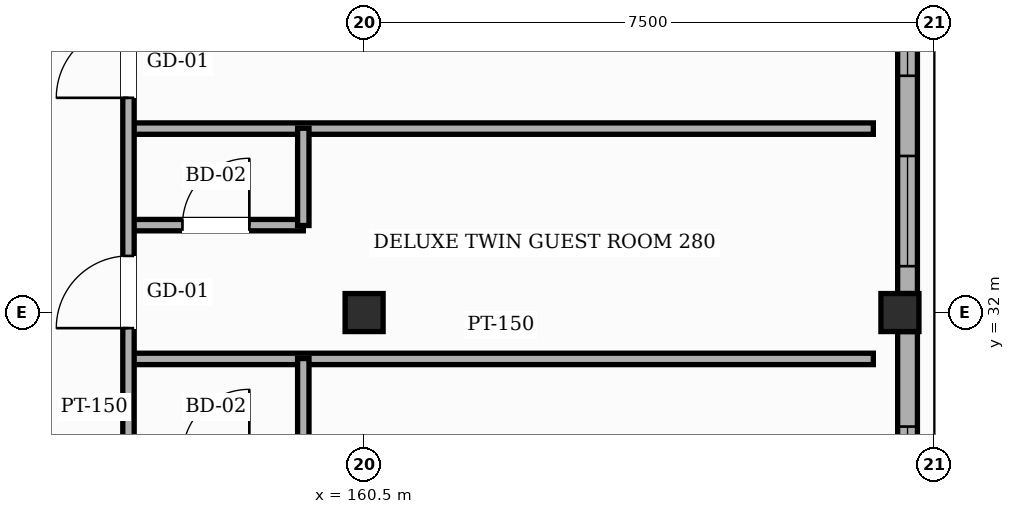
"""IFC4 building model, lengths in metres.
Left out: names, types, materials, properties, quantities, classifications, styles, units other than length and angle.
Written with IfcOpenShell. Run it as: python <this file> out.ifc"""

import sys

from ifc_helpers import new_model, si_unit, direction, frame, frame_2d, origin, origin_2d, place, context, subcontext, project, spatial, rectangle, hollow_rectangle, extrude, element, fill, save


model = new_model("IFC4")
c1 = context("Model", 3, precision=1e-05, world=origin(), true_north=direction((0.0, 1.0)))
c2 = subcontext(c1, "Body", "Model", "MODEL_VIEW")
j1 = project(units=[si_unit("LENGTHUNIT", "METRE"), si_unit("PLANEANGLEUNIT", "RADIAN")], contexts=[c1])
p1 = place(None, origin())
s1 = spatial("IfcSite", under=j1, at=p1, CompositionType="ELEMENT")
p2 = place(p1, origin())
s2 = spatial("IfcBuilding", under=s1, at=p2, CompositionType="ELEMENT")
p3 = place(p2, frame((0.0, 0.0, 39.0)))
s3 = spatial("IfcBuildingStorey", under=s2, at=p3, CompositionType="ELEMENT", Elevation=39.0)
for number, where, z_axis, x_axis in (
    (1, (160.5, 32.0, 0.0), (0.0, 0.0, 1.0), (1.0, 0.0, 0.0)),
    (2, (167.55, 32.0, 0.0), (0.0, 0.0, 1.0), (1.0, 0.0, 0.0)),
):
    element("IfcColumn", number, at=place(p3, frame(where, z_axis=z_axis, x_axis=x_axis)), inside=s3, PredefinedType="COLUMN", context=c2, shape_type="SweptSolid", body=[
        extrude(hollow_rectangle(XDim=0.5, YDim=0.5, WallThickness=0.022, InnerFilletRadius=0.022, OuterFilletRadius=0.044, at=origin_2d()), origin(), (0.0, 0.0, 1.0), 3.6),
    ])
p4 = place(p3, frame((167.65, 31.75, 0.0), z_axis=(0.0, 0.0, 1.0), x_axis=(0.0, -1.0, 0.0)))
e3 = element("IfcWall", 3, at=p4, inside=s3, PredefinedType="SOLIDWALL", context=c2, shape_type="SweptSolid", body=[
    extrude(rectangle(XDim=7.5, YDim=0.26, at=frame_2d((3.75, 0.0))), origin(), (0.0, 0.0, 1.0), 2.755),
])
p5 = place(p4, frame((3.78, 0.0, 0.85)))
e4 = element("IfcOpeningElement", 4, at=p5, cuts=e3, PredefinedType="OPENING", context=c2, shape_type="SweptSolid", body=[
    extrude(rectangle(XDim=2.25, YDim=1.35, at=frame_2d((1.125, 0.675))), frame((0.0, 0.14, 0.0), z_axis=(0.0, -1.0, 0.0), x_axis=(1.0, 0.0, 0.0)), (0.0, 0.0, 1.0), 0.28),
])
p6 = place(p4, frame((1.25, 0.0, 0.85)))
e5 = element("IfcOpeningElement", 5, at=p6, cuts=e3, PredefinedType="OPENING", context=c2, shape_type="SweptSolid", body=[
    extrude(rectangle(XDim=1.25, YDim=1.35, at=frame_2d((0.625, 0.675))), frame((0.0, 0.14, 0.0), z_axis=(0.0, -1.0, 0.0), x_axis=(1.0, 0.0, 0.0)), (0.0, 0.0, 1.0), 0.28),
])
p7 = place(p3, frame((167.65, 40.65, 0.0), z_axis=(0.0, 0.0, 1.0), x_axis=(0.0, -1.0, 0.0)))
e6 = element("IfcWall", 6, at=p7, inside=s3, PredefinedType="SOLIDWALL", context=c2, shape_type="SweptSolid", body=[
    extrude(rectangle(XDim=8.4, YDim=0.26, at=frame_2d((4.2, 0.0))), origin(), (0.0, 0.0, 1.0), 2.755),
])
p8 = place(p7, frame((6.59, 0.0, 0.85)))
e7 = element("IfcOpeningElement", 7, at=p8, cuts=e6, PredefinedType="OPENING", context=c2, shape_type="SweptSolid", body=[
    extrude(rectangle(XDim=1.45, YDim=1.35, at=frame_2d((0.725, 0.675))), frame((0.0, 0.14, 0.0), z_axis=(0.0, -1.0, 0.0), x_axis=(1.0, 0.0, 0.0)), (0.0, 0.0, 1.0), 0.28),
])
p9 = place(p7, frame((3.885, 0.0, 0.85)))
e8 = element("IfcOpeningElement", 8, at=p9, cuts=e6, PredefinedType="OPENING", context=c2, shape_type="SweptSolid", body=[
    extrude(rectangle(XDim=1.65, YDim=1.35, at=frame_2d((0.825, 0.675))), frame((0.0, 0.14, 0.0), z_axis=(0.0, -1.0, 0.0), x_axis=(1.0, 0.0, 0.0)), (0.0, 0.0, 1.0), 0.28),
])
p10 = place(p7, frame((0.755, 0.0, 0.85)))
e9 = element("IfcOpeningElement", 9, at=p10, cuts=e6, PredefinedType="OPENING", context=c2, shape_type="SweptSolid", body=[
    extrude(rectangle(XDim=1.85, YDim=1.35, at=frame_2d((0.925, 0.675))), frame((0.0, 0.14, 0.0), z_axis=(0.0, -1.0, 0.0), x_axis=(1.0, 0.0, 0.0)), (0.0, 0.0, 1.0), 0.28),
])
p11 = place(p3, frame((157.4, 31.39, 0.0), z_axis=(0.0, 0.0, 1.0), x_axis=(1.0, 0.0, 0.0)))
e10 = element("IfcWall", 10, at=p11, inside=s3, PredefinedType="PARTITIONING", context=c2, shape_type="SweptSolid", body=[
    extrude(rectangle(XDim=9.8, YDim=0.15, at=frame_2d((4.9, 0.0))), origin(), (0.0, 0.0, 1.0), 3.365),
])
p12 = place(p3, frame((157.4, 33.15, 0.0), z_axis=(0.0, 0.0, 1.0), x_axis=(1.0, 0.0, 0.0)))
e11 = element("IfcWall", 11, at=p12, inside=s3, PredefinedType="PARTITIONING", context=c2, shape_type="SweptSolid", body=[
    extrude(rectangle(XDim=2.3, YDim=0.15, at=frame_2d((1.15, 0.0))), origin(), (0.0, 0.0, 1.0), 3.365),
])
p13 = place(p12, frame((0.71, 0.0, 0.0)))
e12 = element("IfcOpeningElement", 12, at=p13, cuts=e11, PredefinedType="OPENING", context=c2, shape_type="SweptSolid", body=[
    extrude(rectangle(XDim=0.88, YDim=2.12, at=frame_2d((0.44, 1.06))), frame((0.0, 0.085, 0.0), z_axis=(0.0, -1.0, 0.0), x_axis=(1.0, 0.0, 0.0)), (0.0, 0.0, 1.0), 0.17),
])
p14 = place(p3, frame((157.4, 34.42, 0.0), z_axis=(0.0, 0.0, 1.0), x_axis=(1.0, 0.0, 0.0)))
e13 = element("IfcWall", 13, at=p14, inside=s3, PredefinedType="PARTITIONING", context=c2, shape_type="SweptSolid", body=[
    extrude(rectangle(XDim=9.8, YDim=0.15, at=frame_2d((4.9, 0.0))), origin(), (0.0, 0.0, 1.0), 3.365),
])
p15 = place(p3, frame((157.4, 22.3, 0.0), z_axis=(0.0, 0.0, 1.0), x_axis=(0.0, 1.0, 0.0)))
e14 = element("IfcWall", 14, at=p15, inside=s3, PredefinedType="PARTITIONING", context=c2, shape_type="SweptSolid", body=[
    extrude(rectangle(XDim=48.5, YDim=0.15, at=frame_2d((24.25, 0.0))), origin(), (0.0, 0.0, 1.0), 3.365),
])
p16 = place(p15, frame((0.325, 0.0, 0.0)))
e15 = element("IfcOpeningElement", 15, at=p16, cuts=e14, PredefinedType="OPENING", context=c2, shape_type="SweptSolid", body=[
    extrude(rectangle(XDim=1.1, YDim=2.2, at=frame_2d((0.55, 1.1))), frame((0.0, 0.085, 0.0), z_axis=(0.0, -1.0, 0.0), x_axis=(1.0, 0.0, 0.0)), (0.0, 0.0, 1.0), 0.17),
])
p17 = place(p15, frame((3.43, 0.0, 0.0)))
e16 = element("IfcOpeningElement", 16, at=p17, cuts=e14, PredefinedType="OPENING", context=c2, shape_type="SweptSolid", body=[
    extrude(rectangle(XDim=0.95, YDim=2.15, at=frame_2d((0.475, 1.075))), frame((0.0, 0.085, 0.0), z_axis=(0.0, -1.0, 0.0), x_axis=(1.0, 0.0, 0.0)), (0.0, 0.0, 1.0), 0.17),
])
p18 = place(p15, frame((6.46, 0.0, 0.0)))
e17 = element("IfcOpeningElement", 17, at=p18, cuts=e14, PredefinedType="OPENING", context=c2, shape_type="SweptSolid", body=[
    extrude(rectangle(XDim=0.95, YDim=2.15, at=frame_2d((0.475, 1.075))), frame((0.0, 0.085, 0.0), z_axis=(0.0, -1.0, 0.0), x_axis=(1.0, 0.0, 0.0)), (0.0, 0.0, 1.0), 0.17),
])
p19 = place(p15, frame((9.495, 0.0, 0.0)))
e18 = element("IfcOpeningElement", 18, at=p19, cuts=e14, PredefinedType="OPENING", context=c2, shape_type="SweptSolid", body=[
    extrude(rectangle(XDim=0.95, YDim=2.15, at=frame_2d((0.475, 1.075))), frame((0.0, 0.085, 0.0), z_axis=(0.0, -1.0, 0.0), x_axis=(1.0, 0.0, 0.0)), (0.0, 0.0, 1.0), 0.17),
])
p20 = place(p15, frame((12.525, 0.0, 0.0)))
e19 = element("IfcOpeningElement", 19, at=p20, cuts=e14, PredefinedType="OPENING", context=c2, shape_type="SweptSolid", body=[
    extrude(rectangle(XDim=0.95, YDim=2.15, at=frame_2d((0.475, 1.075))), frame((0.0, 0.085, 0.0), z_axis=(0.0, -1.0, 0.0), x_axis=(1.0, 0.0, 0.0)), (0.0, 0.0, 1.0), 0.17),
])
p21 = place(p15, frame((15.555, 0.0, 0.0)))
e20 = element("IfcOpeningElement", 20, at=p21, cuts=e14, PredefinedType="OPENING", context=c2, shape_type="SweptSolid", body=[
    extrude(rectangle(XDim=0.95, YDim=2.15, at=frame_2d((0.475, 1.075))), frame((0.0, 0.085, 0.0), z_axis=(0.0, -1.0, 0.0), x_axis=(1.0, 0.0, 0.0)), (0.0, 0.0, 1.0), 0.17),
])
p22 = place(p15, frame((18.585, 0.0, 0.0)))
e21 = element("IfcOpeningElement", 21, at=p22, cuts=e14, PredefinedType="OPENING", context=c2, shape_type="SweptSolid", body=[
    extrude(rectangle(XDim=0.95, YDim=2.15, at=frame_2d((0.475, 1.075))), frame((0.0, 0.085, 0.0), z_axis=(0.0, -1.0, 0.0), x_axis=(1.0, 0.0, 0.0)), (0.0, 0.0, 1.0), 0.17),
])
p23 = place(p15, frame((21.62, 0.0, 0.0)))
e22 = element("IfcOpeningElement", 22, at=p23, cuts=e14, PredefinedType="OPENING", context=c2, shape_type="SweptSolid", body=[
    extrude(rectangle(XDim=0.95, YDim=2.15, at=frame_2d((0.475, 1.075))), frame((0.0, 0.085, 0.0), z_axis=(0.0, -1.0, 0.0), x_axis=(1.0, 0.0, 0.0)), (0.0, 0.0, 1.0), 0.17),
])
p24 = place(p15, frame((24.65, 0.0, 0.0)))
e23 = element("IfcOpeningElement", 23, at=p24, cuts=e14, PredefinedType="OPENING", context=c2, shape_type="SweptSolid", body=[
    extrude(rectangle(XDim=0.95, YDim=2.15, at=frame_2d((0.475, 1.075))), frame((0.0, 0.085, 0.0), z_axis=(0.0, -1.0, 0.0), x_axis=(1.0, 0.0, 0.0)), (0.0, 0.0, 1.0), 0.17),
])
p25 = place(p15, frame((27.68, 0.0, 0.0)))
e24 = element("IfcOpeningElement", 24, at=p25, cuts=e14, PredefinedType="OPENING", context=c2, shape_type="SweptSolid", body=[
    extrude(rectangle(XDim=0.95, YDim=2.15, at=frame_2d((0.475, 1.075))), frame((0.0, 0.085, 0.0), z_axis=(0.0, -1.0, 0.0), x_axis=(1.0, 0.0, 0.0)), (0.0, 0.0, 1.0), 0.17),
])
p26 = place(p15, frame((30.71, 0.0, 0.0)))
e25 = element("IfcOpeningElement", 25, at=p26, cuts=e14, PredefinedType="OPENING", context=c2, shape_type="SweptSolid", body=[
    extrude(rectangle(XDim=0.95, YDim=2.15, at=frame_2d((0.475, 1.075))), frame((0.0, 0.085, 0.0), z_axis=(0.0, -1.0, 0.0), x_axis=(1.0, 0.0, 0.0)), (0.0, 0.0, 1.0), 0.17),
])
p27 = place(p15, frame((33.745, 0.0, 0.0)))
e26 = element("IfcOpeningElement", 26, at=p27, cuts=e14, PredefinedType="OPENING", context=c2, shape_type="SweptSolid", body=[
    extrude(rectangle(XDim=0.95, YDim=2.15, at=frame_2d((0.475, 1.075))), frame((0.0, 0.085, 0.0), z_axis=(0.0, -1.0, 0.0), x_axis=(1.0, 0.0, 0.0)), (0.0, 0.0, 1.0), 0.17),
])
p28 = place(p15, frame((36.775, 0.0, 0.0)))
e27 = element("IfcOpeningElement", 27, at=p28, cuts=e14, PredefinedType="OPENING", context=c2, shape_type="SweptSolid", body=[
    extrude(rectangle(XDim=0.95, YDim=2.15, at=frame_2d((0.475, 1.075))), frame((0.0, 0.085, 0.0), z_axis=(0.0, -1.0, 0.0), x_axis=(1.0, 0.0, 0.0)), (0.0, 0.0, 1.0), 0.17),
])
p29 = place(p15, frame((39.805, 0.0, 0.0)))
e28 = element("IfcOpeningElement", 28, at=p29, cuts=e14, PredefinedType="OPENING", context=c2, shape_type="SweptSolid", body=[
    extrude(rectangle(XDim=0.95, YDim=2.15, at=frame_2d((0.475, 1.075))), frame((0.0, 0.085, 0.0), z_axis=(0.0, -1.0, 0.0), x_axis=(1.0, 0.0, 0.0)), (0.0, 0.0, 1.0), 0.17),
])
p30 = place(p15, frame((42.84, 0.0, 0.0)))
e29 = element("IfcOpeningElement", 29, at=p30, cuts=e14, PredefinedType="OPENING", context=c2, shape_type="SweptSolid", body=[
    extrude(rectangle(XDim=0.95, YDim=2.15, at=frame_2d((0.475, 1.075))), frame((0.0, 0.085, 0.0), z_axis=(0.0, -1.0, 0.0), x_axis=(1.0, 0.0, 0.0)), (0.0, 0.0, 1.0), 0.17),
])
p31 = place(p15, frame((45.87, 0.0, 0.0)))
e30 = element("IfcOpeningElement", 30, at=p31, cuts=e14, PredefinedType="OPENING", context=c2, shape_type="SweptSolid", body=[
    extrude(rectangle(XDim=0.95, YDim=2.15, at=frame_2d((0.475, 1.075))), frame((0.0, 0.085, 0.0), z_axis=(0.0, -1.0, 0.0), x_axis=(1.0, 0.0, 0.0)), (0.0, 0.0, 1.0), 0.17),
])
p32 = place(p3, frame((159.7, 30.11, 0.0), z_axis=(0.0, 0.0, 1.0), x_axis=(0.0, 1.0, 0.0)))
e31 = element("IfcWall", 31, at=p32, inside=s3, PredefinedType="PARTITIONING", context=c2, shape_type="SweptSolid", body=[
    extrude(rectangle(XDim=1.285, YDim=0.15, at=frame_2d((0.643, 0.0))), origin(), (0.0, 0.0, 1.0), 3.365),
])
p33 = place(p3, frame((159.7, 33.145, 0.0), z_axis=(0.0, 0.0, 1.0), x_axis=(0.0, 1.0, 0.0)))
e32 = element("IfcWall", 32, at=p33, inside=s3, PredefinedType="PARTITIONING", context=c2, shape_type="SweptSolid", body=[
    extrude(rectangle(XDim=1.28, YDim=0.15, at=frame_2d((0.64, 0.0))), origin(), (0.0, 0.0, 1.0), 3.365),
])
p34 = place(p6, origin())
e33 = element("IfcWindow", 33, at=p34, inside=s3, PartitioningType="SINGLE_PANEL", PredefinedType="WINDOW", context=c2, shape_type="SweptSolid", body=[
    extrude(rectangle(XDim=1.25, YDim=1.35, at=frame_2d((0.625, 0.675))), frame((0.0, 0.03, 0.0), z_axis=(0.0, -1.0, 0.0), x_axis=(1.0, 0.0, 0.0)), (0.0, 0.0, 1.0), 0.06),
])
fill(e5, e33)
p35 = place(p8, origin())
e34 = element("IfcWindow", 34, at=p35, inside=s3, PartitioningType="SINGLE_PANEL", PredefinedType="WINDOW", context=c2, shape_type="SweptSolid", body=[
    extrude(rectangle(XDim=1.45, YDim=1.35, at=frame_2d((0.725, 0.675))), frame((0.0, 0.03, 0.0), z_axis=(0.0, -1.0, 0.0), x_axis=(1.0, 0.0, 0.0)), (0.0, 0.0, 1.0), 0.06),
])
fill(e7, e34)
p36 = place(p9, origin())
e35 = element("IfcWindow", 35, at=p36, inside=s3, PartitioningType="SINGLE_PANEL", PredefinedType="WINDOW", context=c2, shape_type="SweptSolid", body=[
    extrude(rectangle(XDim=1.65, YDim=1.35, at=frame_2d((0.825, 0.675))), frame((0.0, 0.03, 0.0), z_axis=(0.0, -1.0, 0.0), x_axis=(1.0, 0.0, 0.0)), (0.0, 0.0, 1.0), 0.06),
])
fill(e8, e35)
p37 = place(p19, origin())
e36 = element("IfcDoor", 36, at=p37, inside=s3, OperationType="SINGLE_SWING_LEFT", PredefinedType="DOOR", context=c2, shape_type="SweptSolid", body=[
    extrude(rectangle(XDim=0.95, YDim=2.15, at=frame_2d((0.475, 1.075))), frame((0.0, 0.025, 0.0), z_axis=(0.0, -1.0, 0.0), x_axis=(1.0, 0.0, 0.0)), (0.0, 0.0, 1.0), 0.05),
])
fill(e18, e36)
p38 = place(p13, origin())
e37 = element("IfcDoor", 37, at=p38, inside=s3, OperationType="SINGLE_SWING_RIGHT", PredefinedType="DOOR", context=c2, shape_type="SweptSolid", body=[
    extrude(rectangle(XDim=0.88, YDim=2.12, at=frame_2d((0.44, 1.06))), frame((0.0, 0.025, 0.0), z_axis=(0.0, -1.0, 0.0), x_axis=(1.0, 0.0, 0.0)), (0.0, 0.0, 1.0), 0.05),
])
fill(e12, e37)
p39 = place(p20, origin())
e38 = element("IfcDoor", 38, at=p39, inside=s3, OperationType="SINGLE_SWING_LEFT", PredefinedType="DOOR", context=c2, shape_type="SweptSolid", body=[
    extrude(rectangle(XDim=0.95, YDim=2.15, at=frame_2d((0.475, 1.075))), frame((0.0, 0.025, 0.0), z_axis=(0.0, -1.0, 0.0), x_axis=(1.0, 0.0, 0.0)), (0.0, 0.0, 1.0), 0.05),
])
fill(e19, e38)
save(model, sys.argv[1])
